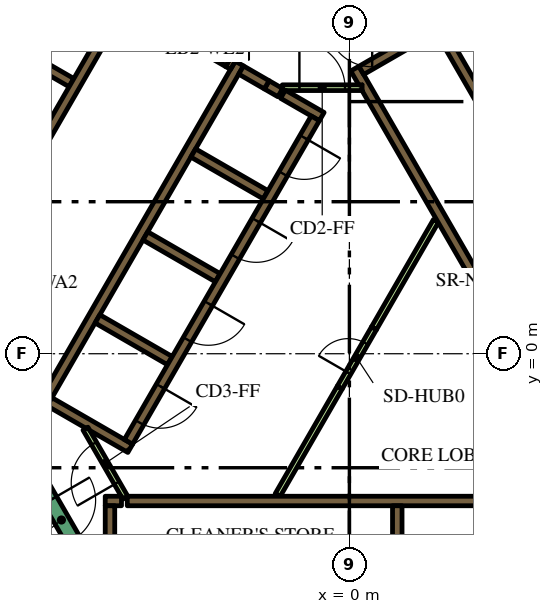
"""IFC4 building model, lengths in metres.
Left out: names, types, materials, properties, quantities, classifications, styles, units other than length and angle.
Written with IfcOpenShell. Run it as: python <this file> out.ifc"""

import sys

from ifc_helpers import new_model, si_unit, direction, frame, frame_2d, origin, place, context, subcontext, project, spatial, polyline, rectangle, outline, extrude, element, fill, save


model = new_model("IFC4")
c1 = context("Model", 3, precision=1e-05, world=origin(), true_north=direction((0.0, 1.0)))
c2 = subcontext(c1, "Body", "Model", "MODEL_VIEW")
j1 = project(units=[si_unit("LENGTHUNIT", "METRE"), si_unit("PLANEANGLEUNIT", "RADIAN")], contexts=[c1])
p1 = place(None, origin())
s1 = spatial("IfcSite", under=j1, at=p1, CompositionType="ELEMENT")
p2 = place(p1, origin())
s2 = spatial("IfcBuilding", under=s1, at=p2, CompositionType="ELEMENT")
p3 = place(p2, frame((0.0, 0.0, 83.7)))
s3 = spatial("IfcBuildingStorey", under=s2, at=p3, CompositionType="ELEMENT", Elevation=83.7)
p4 = place(p3, frame((-15.36, -1.503, 0.0), z_axis=(0.0, 0.0, 1.0), x_axis=(0.50000389221, 0.866023156604, 0.0)))
e1 = element("IfcWall", 1, at=p4, inside=s3, PredefinedType="SOLIDWALL", context=c2, shape_type="SweptSolid", body=[
    extrude(rectangle(XDim=21.0, YDim=0.9, at=frame_2d((10.5, 0.0))), origin(), (0.0, 0.0, 1.0), 3.9),
])
p5 = place(p3, frame((-5.845, -3.875, 0.0), z_axis=(0.0, 0.0, 1.0), x_axis=(1.0, 0.0, 0.0)))
e2 = element("IfcWall", 2, at=p5, inside=s3, PredefinedType="SOLIDWALL", context=c2, shape_type="SweptSolid", body=[
    extrude(rectangle(XDim=12.27, YDim=0.25, at=frame_2d((6.135, 0.0))), origin(), (0.0, 0.0, 1.0), 3.9),
])
p6 = place(p3, frame((-6.425, -3.875, 0.0), z_axis=(0.0, 0.0, 1.0), x_axis=(1.0, 0.0, 0.0)))
e3 = element("IfcWall", 3, at=p6, inside=s3, PredefinedType="SOLIDWALL", context=c2, shape_type="SweptSolid", body=[
    extrude(rectangle(XDim=0.428, YDim=0.25, at=frame_2d((0.214, 0.0))), origin(), (0.0, 0.0, 1.0), 3.9),
])
p7 = place(p3, frame((1.26, -4.0, 0.0), z_axis=(0.0, 0.0, 1.0), x_axis=(0.0, -1.0, 0.0)))
e4 = element("IfcWall", 4, at=p7, inside=s3, PredefinedType="SOLIDWALL", context=c2, shape_type="SweptSolid", body=[
    extrude(rectangle(XDim=2.2, YDim=0.25, at=frame_2d((1.1, 0.0))), origin(), (0.0, 0.0, 1.0), 3.9),
])
p8 = place(p3, frame((-6.3, -4.0, 0.0), z_axis=(0.0, 0.0, 1.0), x_axis=(0.0, -1.0, 0.0)))
e5 = element("IfcWall", 5, at=p8, inside=s3, PredefinedType="SOLIDWALL", context=c2, shape_type="SweptSolid", body=[
    extrude(rectangle(XDim=3.154, YDim=0.25, at=frame_2d((1.577, 0.0))), origin(), (0.0, 0.0, 1.0), 3.9),
])
p9 = place(p3, origin())
e6 = element("IfcWall", 6, at=p9, inside=s3, PredefinedType="SOLIDWALL", context=c2, shape_type="SweptSolid", body=[
    extrude(outline(polyline([(0.335, 6.925), (0.335, 7.075), (0.335, 7.075), (0.335, 7.075), (0.245, 7.075), (0.079, 7.363), (0.035, 7.439), (0.252, 7.564), (0.377, 7.348), (6.552, -3.348), (6.677, -3.564), (6.46, -3.689), (4.897, -0.981), (0.332, 6.925), (0.335, 6.925), (0.335, 6.925), (0.335, 6.925)])), origin(), (0.0, 0.0, 1.0), 3.9),
])
p10 = place(p3, frame((0.314, 7.456, 0.0), z_axis=(0.0, 0.0, 1.0), x_axis=(0.866013897511, 0.50001992892, 0.0)))
e7 = element("IfcWall", 7, at=p10, inside=s3, PredefinedType="SOLIDWALL", context=c2, shape_type="SweptSolid", body=[
    extrude(rectangle(XDim=3.268, YDim=0.25, at=frame_2d((1.634, 0.0))), origin(), (0.0, 0.0, 1.0), 3.9),
])
p11 = place(p3, frame((-8.06, -1.311, 0.0), z_axis=(0.0, 0.0, 1.0), x_axis=(0.50000273126, 0.866023826885, 0.0)))
e8 = element("IfcWall", 8, at=p11, inside=s3, PredefinedType="SOLIDWALL", context=c2, shape_type="SweptSolid", body=[
    extrude(rectangle(XDim=10.33, YDim=0.25, at=frame_2d((5.165, 0.0))), origin(), (0.0, 0.0, 1.0), 3.9),
])
p12 = place(p3, frame((-1.819, 6.87, 0.0), z_axis=(0.0, 0.0, 1.0), x_axis=(-0.866294599386, 0.499533449405, 0.0)))
e9 = element("IfcWall", 9, at=p12, inside=s3, PredefinedType="SOLIDWALL", context=c2, shape_type="SweptSolid", body=[
    extrude(rectangle(XDim=0.41, YDim=0.25, at=frame_2d((0.205, 0.0))), origin(), (0.0, 0.0, 1.0), 3.9),
])
p13 = place(p3, frame((-2.849, 7.465, 0.0), z_axis=(0.0, 0.0, 1.0), x_axis=(0.865955664968, -0.500120771724, 0.0)))
e10 = element("IfcWall", 10, at=p13, inside=s3, PredefinedType="SOLIDWALL", context=c2, shape_type="SweptSolid", body=[
    extrude(rectangle(XDim=0.778, YDim=0.25, at=frame_2d((0.389, 0.0))), origin(), (0.0, 0.0, 1.0), 3.9),
])
p14 = place(p3, frame((-0.728, 6.24, 0.0), z_axis=(0.0, 0.0, 1.0), x_axis=(-0.866002680491, 0.500039355833, 0.0)))
e11 = element("IfcWall", 11, at=p14, inside=s3, PredefinedType="SOLIDWALL", context=c2, shape_type="SweptSolid", body=[
    extrude(rectangle(XDim=1.178, YDim=0.25, at=frame_2d((0.589, 0.0))), origin(), (0.0, 0.0, 1.0), 3.9),
])
for number, where, z_axis, x_axis in (
    (12, (-2.204, 4.182, 0.0), (0.0, 0.0, 1.0), (-0.866, 0.5, 0.0)),
    (13, (-5.369, 3.1, 0.0), (0.0, 0.0, 1.0), (0.866, -0.5, 0.0)),
    (14, (-4.724, -0.182, 0.0), (0.0, 0.0, 1.0), (-0.866, 0.5, 0.0)),
):
    element("IfcWall", number, at=place(p3, frame(where, z_axis=z_axis, x_axis=x_axis)), inside=s3, PredefinedType="SOLIDWALL", context=c2, shape_type="SweptSolid", body=[
        extrude(rectangle(XDim=2.2, YDim=0.25, at=frame_2d((1.1, 0.0))), origin(), (0.0, 0.0, 1.0), 3.9),
    ])
e15 = element("IfcWall", 15, at=p9, inside=s3, PredefinedType="SOLIDWALL", context=c2, shape_type="SweptSolid", body=[
    extrude(outline(polyline([(-5.922, -2.257), (-5.922, -2.257), (-5.705, -2.382), (-5.83, -2.598), (-6.829, -2.021), (-6.88, -1.934), (-6.88, -1.934), (-6.93, -1.963), (-7.952, -1.373), (-7.827, -1.156), (-5.922, -2.257)])), origin(), (0.0, 0.0, 1.0), 3.9),
])
e16 = element("IfcWall", 16, at=p9, inside=s3, PredefinedType="SOLIDWALL", context=c2, shape_type="SweptSolid", body=[
    extrude(outline(polyline([(-3.128, 7.481), (-3.259, 7.557), (-3.134, 7.773), (-3.003, 7.698), (-3.128, 7.481)])), origin(), (0.0, 0.0, 1.0), 3.9),
])
p15 = place(p3, frame((-7.314, 7.132, 0.0), z_axis=(0.0, 0.0, 1.0), x_axis=(-0.866008176907, 0.50002983664, 0.0)))
e17 = element("IfcWall", 17, at=p15, inside=s3, PredefinedType="SOLIDWALL", context=c2, shape_type="SweptSolid", body=[
    extrude(rectangle(XDim=2.2, YDim=0.25, at=frame_2d((1.1, 0.0))), origin(), (0.0, 0.0, 1.0), 3.9),
])
for number, where, z_axis, x_axis in (
    (18, (-1.887, -3.718, 0.0), (0.0, 0.0, 1.0), (0.5, 0.866, 0.0)),
    (19, (0.645, 0.667, 0.0), (0.0, 0.0, 1.0), (0.5, 0.866, 0.0)),
):
    element("IfcWall", number, at=place(p3, frame(where, z_axis=z_axis, x_axis=x_axis)), inside=s3, PredefinedType="PARTITIONING", context=c2, shape_type="SweptSolid", body=[
        extrude(rectangle(XDim=3.263, YDim=0.15, at=frame_2d((1.632, 0.0))), origin(), (0.0, 0.0, 1.0), 2.75),
    ])
p16 = place(p3, frame((8.565, -2.185, 0.0), z_axis=(0.0, 0.0, 1.0), x_axis=(-0.499997954832, 0.866026584559, 0.0)))
e20 = element("IfcWall", 20, at=p16, inside=s3, PredefinedType="SOLIDWALL", context=c2, shape_type="SweptSolid", body=[
    extrude(rectangle(XDim=12.35, YDim=0.25, at=frame_2d((6.175, 0.0))), origin(), (0.0, 0.0, 1.0), 3.9),
])
p17 = place(p16, frame((5.725, 0.0, 0.0)))
e21 = element("IfcOpeningElement", 21, at=p17, cuts=e20, PredefinedType="OPENING", context=c2, shape_type="SweptSolid", body=[
    extrude(rectangle(XDim=0.9, YDim=2.1, at=frame_2d((0.45, 1.05))), frame((0.0, 0.135, 0.0), z_axis=(0.0, -1.0, 0.0), x_axis=(1.0, 0.0, 0.0)), (0.0, 0.0, 1.0), 0.27),
])
p18 = place(p3, frame((-6.008, 9.144, 0.0), z_axis=(0.0, 0.0, 1.0), x_axis=(-0.500006956611, -0.866021387346, 0.0)))
e22 = element("IfcWall", 22, at=p18, inside=s3, PredefinedType="SOLIDWALL", context=c2, shape_type="SweptSolid", body=[
    extrude(rectangle(XDim=9.83, YDim=0.25, at=frame_2d((4.915, 0.0))), origin(), (0.0, 0.0, 1.0), 3.9),
])
p19 = place(p18, frame((6.985, 0.0, 0.0)))
e23 = element("IfcOpeningElement", 23, at=p19, cuts=e22, PredefinedType="OPENING", context=c2, shape_type="SweptSolid", body=[
    extrude(rectangle(XDim=0.9, YDim=2.1, at=frame_2d((0.45, 1.05))), frame((0.0, 0.135, 0.0), z_axis=(0.0, -1.0, 0.0), x_axis=(1.0, 0.0, 0.0)), (0.0, 0.0, 1.0), 0.27),
])
p20 = place(p3, frame((-0.898, 6.194, 0.0), z_axis=(0.0, 0.0, 1.0), x_axis=(-0.499996202215, -0.866027596426, 0.0)))
e24 = element("IfcWall", 24, at=p20, inside=s3, PredefinedType="SOLIDWALL", context=c2, shape_type="SweptSolid", body=[
    extrude(rectangle(XDim=9.83, YDim=0.25, at=frame_2d((4.915, 0.0))), origin(), (0.0, 0.0, 1.0), 3.9),
])
p21 = place(p20, frame((0.585, 0.0, 0.0)))
e25 = element("IfcOpeningElement", 25, at=p21, cuts=e24, PredefinedType="OPENING", context=c2, shape_type="SweptSolid", body=[
    extrude(rectangle(XDim=1.1, YDim=2.1, at=frame_2d((0.55, 1.05))), frame((0.0, 0.135, 0.0), z_axis=(0.0, -1.0, 0.0), x_axis=(1.0, 0.0, 0.0)), (0.0, 0.0, 1.0), 0.27),
])
p22 = place(p20, frame((3.105, 0.0, 0.0)))
e26 = element("IfcOpeningElement", 26, at=p22, cuts=e24, PredefinedType="OPENING", context=c2, shape_type="SweptSolid", body=[
    extrude(rectangle(XDim=1.1, YDim=2.1, at=frame_2d((0.55, 1.05))), frame((0.0, 0.135, 0.0), z_axis=(0.0, -1.0, 0.0), x_axis=(1.0, 0.0, 0.0)), (0.0, 0.0, 1.0), 0.27),
])
p23 = place(p20, frame((5.625, 0.0, 0.0)))
e27 = element("IfcOpeningElement", 27, at=p23, cuts=e24, PredefinedType="OPENING", context=c2, shape_type="SweptSolid", body=[
    extrude(rectangle(XDim=1.1, YDim=2.1, at=frame_2d((0.55, 1.05))), frame((0.0, 0.135, 0.0), z_axis=(0.0, -1.0, 0.0), x_axis=(1.0, 0.0, 0.0)), (0.0, 0.0, 1.0), 0.27),
])
p24 = place(p20, frame((8.145, 0.0, 0.0)))
e28 = element("IfcOpeningElement", 28, at=p24, cuts=e24, PredefinedType="OPENING", context=c2, shape_type="SweptSolid", body=[
    extrude(rectangle(XDim=1.1, YDim=2.1, at=frame_2d((0.55, 1.05))), frame((0.0, 0.135, 0.0), z_axis=(0.0, -1.0, 0.0), x_axis=(1.0, 0.0, 0.0)), (0.0, 0.0, 1.0), 0.27),
])
p25 = place(p3, frame((-8.103, -3.466, 0.0), z_axis=(0.0, 0.0, 1.0), x_axis=(0.500078061341, -0.865980330357, 0.0)))
e29 = element("IfcWall", 29, at=p25, inside=s3, PredefinedType="SOLIDWALL", context=c2, shape_type="SweptSolid", body=[
    extrude(rectangle(XDim=2.1, YDim=0.4, at=frame_2d((1.05, 0.0))), origin(), (0.0, 0.0, 1.0), 3.9),
])
p26 = place(p25, frame((0.45, 0.0, 0.0)))
e30 = element("IfcOpeningElement", 30, at=p26, cuts=e29, PredefinedType="OPENING", context=c2, shape_type="SweptSolid", body=[
    extrude(rectangle(XDim=1.2, YDim=2.1, at=frame_2d((0.6, 1.05))), frame((0.0, 0.21, 0.0), z_axis=(0.0, -1.0, 0.0), x_axis=(1.0, 0.0, 0.0)), (0.0, 0.0, 1.0), 0.42),
])
p27 = place(p3, frame((-1.765, 7.0, 0.0), z_axis=(0.0, 0.0, 1.0), x_axis=(1.0, 0.0, 0.0)))
e31 = element("IfcWall", 31, at=p27, inside=s3, PredefinedType="PARTITIONING", context=c2, shape_type="SweptSolid", body=[
    extrude(rectangle(XDim=2.1, YDim=0.15, at=frame_2d((1.05, 0.0))), origin(), (0.0, 0.0, 1.0), 2.75),
])
p28 = place(p27, frame((0.45, 0.0, 0.0)))
e32 = element("IfcOpeningElement", 32, at=p28, cuts=e31, PredefinedType="OPENING", context=c2, shape_type="SweptSolid", body=[
    extrude(rectangle(XDim=1.2, YDim=2.1, at=frame_2d((0.6, 1.05))), frame((0.0, 0.085, 0.0), z_axis=(0.0, -1.0, 0.0), x_axis=(1.0, 0.0, 0.0)), (0.0, 0.0, 1.0), 0.17),
])
p29 = place(p3, frame((-5.895, -3.79, 0.0), z_axis=(0.0, 0.0, 1.0), x_axis=(-0.49994051562, 0.866059744384, 0.0)))
e33 = element("IfcWall", 33, at=p29, inside=s3, PredefinedType="PARTITIONING", context=c2, shape_type="SweptSolid", body=[
    extrude(rectangle(XDim=2.1, YDim=0.15, at=frame_2d((1.05, 0.0))), origin(), (0.0, 0.0, 1.0), 2.75),
])
p30 = place(p29, frame((0.45, 0.0, 0.0)))
e34 = element("IfcOpeningElement", 34, at=p30, cuts=e33, PredefinedType="OPENING", context=c2, shape_type="SweptSolid", body=[
    extrude(rectangle(XDim=1.2, YDim=2.1, at=frame_2d((0.6, 1.05))), frame((0.0, 0.085, 0.0), z_axis=(0.0, -1.0, 0.0), x_axis=(1.0, 0.0, 0.0)), (0.0, 0.0, 1.0), 0.17),
])
p31 = place(p3, frame((-4.409, 8.365, 0.0), z_axis=(0.0, 0.0, 1.0), x_axis=(0.866034573852, -0.49998411664, 0.0)))
e35 = element("IfcWall", 35, at=p31, inside=s3, PredefinedType="SOLIDWALL", context=c2, shape_type="SweptSolid", body=[
    extrude(rectangle(XDim=1.4, YDim=0.25, at=frame_2d((0.7, 0.0))), origin(), (0.0, 0.0, 1.0), 3.9),
])
p32 = place(p31, frame((0.1, 0.0, 0.0)))
e36 = element("IfcOpeningElement", 36, at=p32, cuts=e35, PredefinedType="OPENING", context=c2, shape_type="SweptSolid", body=[
    extrude(rectangle(XDim=1.2, YDim=2.1, at=frame_2d((0.6, 1.05))), frame((0.0, 0.135, 0.0), z_axis=(0.0, -1.0, 0.0), x_axis=(1.0, 0.0, 0.0)), (0.0, 0.0, 1.0), 0.27),
])
p33 = place(p3, frame((-0.255, -0.892, 0.0), z_axis=(0.0, 0.0, 1.0), x_axis=(0.500062916607, 0.865989075817, 0.0)))
e37 = element("IfcWall", 37, at=p33, inside=s3, PredefinedType="PARTITIONING", context=c2, shape_type="SweptSolid", body=[
    extrude(rectangle(XDim=1.8, YDim=0.15, at=frame_2d((0.9, 0.0))), origin(), (0.0, 0.0, 1.0), 2.75),
])
p34 = place(p33, frame((0.45, 0.0, 0.0)))
e38 = element("IfcOpeningElement", 38, at=p34, cuts=e37, PredefinedType="OPENING", context=c2, shape_type="SweptSolid", body=[
    extrude(rectangle(XDim=0.9, YDim=2.1, at=frame_2d((0.45, 1.05))), frame((0.0, 0.085, 0.0), z_axis=(0.0, -1.0, 0.0), x_axis=(1.0, 0.0, 0.0)), (0.0, 0.0, 1.0), 0.17),
])
p35 = place(p3, frame((-19.081, -3.9, 0.0), z_axis=(0.0, 0.0, 1.0), x_axis=(0.499998313975, 0.866026377209, 0.0)))
e39 = element("IfcWall", 39, at=p35, inside=s3, PredefinedType="PARTITIONING", context=c2, shape_type="SweptSolid", body=[
    extrude(rectangle(XDim=25.766, YDim=0.15, at=frame_2d((12.883, 0.0))), origin(), (0.0, 0.0, 1.0), 2.75),
])
p36 = place(p35, frame((19.306, 0.0, 0.0)))
e40 = element("IfcOpeningElement", 40, at=p36, cuts=e39, PredefinedType="OPENING", context=c2, shape_type="SweptSolid", body=[
    extrude(rectangle(XDim=1.0, YDim=2.1, at=frame_2d((0.5, 1.05))), frame((0.0, 0.085, 0.0), z_axis=(0.0, -1.0, 0.0), x_axis=(1.0, 0.0, 0.0)), (0.0, 0.0, 1.0), 0.17),
])
p37 = place(p35, frame((18.0, 0.0, 0.0)))
e41 = element("IfcOpeningElement", 41, at=p37, cuts=e39, PredefinedType="OPENING", context=c2, shape_type="SweptSolid", body=[
    extrude(rectangle(XDim=1.0, YDim=2.1, at=frame_2d((0.5, 1.05))), frame((0.0, 0.085, 0.0), z_axis=(0.0, -1.0, 0.0), x_axis=(1.0, 0.0, 0.0)), (0.0, 0.0, 1.0), 0.17),
])
p38 = place(p35, frame((10.874, 0.0, 0.0)))
e42 = element("IfcOpeningElement", 42, at=p38, cuts=e39, PredefinedType="OPENING", context=c2, shape_type="SweptSolid", body=[
    extrude(rectangle(XDim=0.9, YDim=2.1, at=frame_2d((0.45, 1.05))), frame((0.0, 0.085, 0.0), z_axis=(0.0, -1.0, 0.0), x_axis=(1.0, 0.0, 0.0)), (0.0, 0.0, 1.0), 0.17),
])
p39 = place(p35, frame((8.548, 0.0, 0.0)))
e43 = element("IfcOpeningElement", 43, at=p39, cuts=e39, PredefinedType="OPENING", context=c2, shape_type="SweptSolid", body=[
    extrude(rectangle(XDim=1.1, YDim=2.1, at=frame_2d((0.55, 1.05))), frame((0.0, 0.085, 0.0), z_axis=(0.0, -1.0, 0.0), x_axis=(1.0, 0.0, 0.0)), (0.0, 0.0, 1.0), 0.17),
])
p40 = place(p35, frame((0.18, 0.0, 0.0)))
e44 = element("IfcOpeningElement", 44, at=p40, cuts=e39, PredefinedType="OPENING", context=c2, shape_type="SweptSolid", body=[
    extrude(rectangle(XDim=1.0, YDim=2.1, at=frame_2d((0.5, 1.05))), frame((0.0, 0.085, 0.0), z_axis=(0.0, -1.0, 0.0), x_axis=(1.0, 0.0, 0.0)), (0.0, 0.0, 1.0), 0.17),
])
p41 = place(p21, origin())
e45 = element("IfcDoor", 45, at=p41, inside=s3, OperationType="DOUBLE_DOOR_SLIDING", PredefinedType="DOOR", context=c2, shape_type="SweptSolid", body=[
    extrude(rectangle(XDim=1.1, YDim=2.1, at=frame_2d((0.55, 1.05))), frame((0.0, 0.025, 0.0), z_axis=(0.0, -1.0, 0.0), x_axis=(1.0, 0.0, 0.0)), (0.0, 0.0, 1.0), 0.05),
])
fill(e25, e45)
p42 = place(p22, origin())
e46 = element("IfcDoor", 46, at=p42, inside=s3, OperationType="DOUBLE_DOOR_SLIDING", PredefinedType="DOOR", context=c2, shape_type="SweptSolid", body=[
    extrude(rectangle(XDim=1.1, YDim=2.1, at=frame_2d((0.55, 1.05))), frame((0.0, 0.025, 0.0), z_axis=(0.0, -1.0, 0.0), x_axis=(1.0, 0.0, 0.0)), (0.0, 0.0, 1.0), 0.05),
])
fill(e26, e46)
p43 = place(p23, origin())
e47 = element("IfcDoor", 47, at=p43, inside=s3, OperationType="DOUBLE_DOOR_SLIDING", PredefinedType="DOOR", context=c2, shape_type="SweptSolid", body=[
    extrude(rectangle(XDim=1.1, YDim=2.1, at=frame_2d((0.55, 1.05))), frame((0.0, 0.025, 0.0), z_axis=(0.0, -1.0, 0.0), x_axis=(1.0, 0.0, 0.0)), (0.0, 0.0, 1.0), 0.05),
])
fill(e27, e47)
p44 = place(p24, origin())
e48 = element("IfcDoor", 48, at=p44, inside=s3, OperationType="DOUBLE_DOOR_SLIDING", PredefinedType="DOOR", context=c2, shape_type="SweptSolid", body=[
    extrude(rectangle(XDim=1.1, YDim=2.1, at=frame_2d((0.55, 1.05))), frame((0.0, 0.025, 0.0), z_axis=(0.0, -1.0, 0.0), x_axis=(1.0, 0.0, 0.0)), (0.0, 0.0, 1.0), 0.05),
])
fill(e28, e48)
p45 = place(p26, origin())
e49 = element("IfcDoor", 49, at=p45, inside=s3, OperationType="SINGLE_SWING_LEFT", PredefinedType="DOOR", context=c2, shape_type="SweptSolid", body=[
    extrude(rectangle(XDim=1.2, YDim=2.1, at=frame_2d((0.6, 1.05))), frame((0.0, 0.025, 0.0), z_axis=(0.0, -1.0, 0.0), x_axis=(1.0, 0.0, 0.0)), (0.0, 0.0, 1.0), 0.05),
])
fill(e30, e49)
p46 = place(p28, origin())
e50 = element("IfcDoor", 50, at=p46, inside=s3, OperationType="SINGLE_SWING_LEFT", PredefinedType="DOOR", context=c2, shape_type="SweptSolid", body=[
    extrude(rectangle(XDim=1.2, YDim=2.1, at=frame_2d((0.6, 1.05))), frame((0.0, 0.025, 0.0), z_axis=(0.0, -1.0, 0.0), x_axis=(1.0, 0.0, 0.0)), (0.0, 0.0, 1.0), 0.05),
])
fill(e32, e50)
p47 = place(p30, origin())
e51 = element("IfcDoor", 51, at=p47, inside=s3, OperationType="SINGLE_SWING_LEFT", PredefinedType="DOOR", context=c2, shape_type="SweptSolid", body=[
    extrude(rectangle(XDim=1.2, YDim=2.1, at=frame_2d((0.6, 1.05))), frame((0.0, 0.025, 0.0), z_axis=(0.0, -1.0, 0.0), x_axis=(1.0, 0.0, 0.0)), (0.0, 0.0, 1.0), 0.05),
])
fill(e34, e51)
p48 = place(p32, origin())
e52 = element("IfcDoor", 52, at=p48, inside=s3, OperationType="SINGLE_SWING_LEFT", PredefinedType="DOOR", context=c2, shape_type="SweptSolid", body=[
    extrude(rectangle(XDim=1.2, YDim=2.1, at=frame_2d((0.6, 1.05))), frame((0.0, 0.025, 0.0), z_axis=(0.0, -1.0, 0.0), x_axis=(1.0, 0.0, 0.0)), (0.0, 0.0, 1.0), 0.05),
])
fill(e36, e52)
p49 = place(p34, origin())
e53 = element("IfcDoor", 53, at=p49, inside=s3, OperationType="SINGLE_SWING_LEFT", PredefinedType="DOOR", context=c2, shape_type="SweptSolid", body=[
    extrude(rectangle(XDim=0.9, YDim=2.1, at=frame_2d((0.45, 1.05))), frame((0.0, 0.025, 0.0), z_axis=(0.0, -1.0, 0.0), x_axis=(1.0, 0.0, 0.0)), (0.0, 0.0, 1.0), 0.05),
])
fill(e38, e53)
save(model, sys.argv[1])
